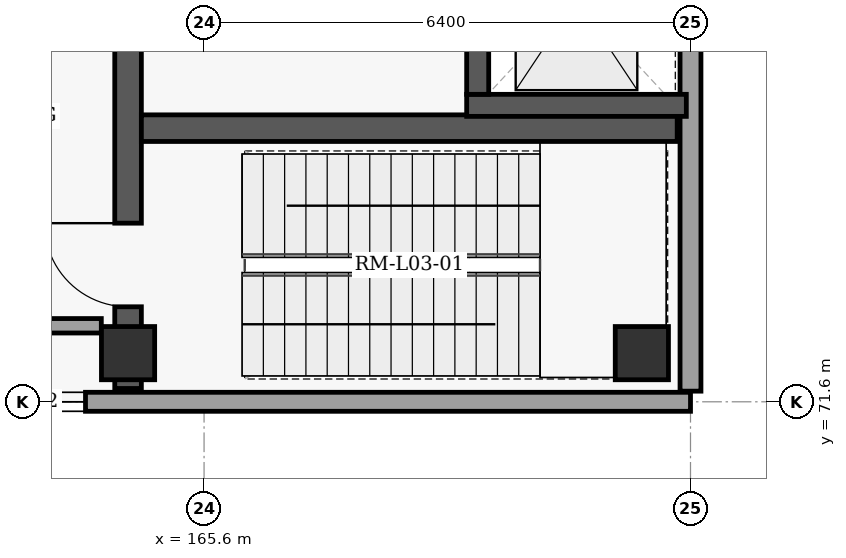
"""IFC4 building model, lengths in metres.
Left out: names, types, materials, properties, quantities, classifications, styles, units other than length and angle.
Written with IfcOpenShell. Run it as: python <this file> out.ifc"""

import sys

from ifc_helpers import new_model, si_unit, direction, frame, frame_2d, origin, origin_2d, place, context, subcontext, project, spatial, rectangle, extrude, element, fill, save


model = new_model("IFC4")
c1 = context("Model", 3, precision=1e-05, world=origin(), true_north=direction((0.0, 1.0)))
c2 = subcontext(c1, "Body", "Model", "MODEL_VIEW")
j1 = project(units=[si_unit("LENGTHUNIT", "METRE"), si_unit("PLANEANGLEUNIT", "RADIAN")], contexts=[c1])
p1 = place(None, origin())
s1 = spatial("IfcSite", under=j1, at=p1, CompositionType="ELEMENT")
p2 = place(p1, origin())
s2 = spatial("IfcBuilding", under=s1, at=p2, CompositionType="ELEMENT")
p3 = place(p2, frame((0.0, 0.0, 15.6)))
s3 = spatial("IfcBuildingStorey", under=s2, at=p3, CompositionType="ELEMENT", Elevation=15.6)
for number, where, z_axis, x_axis in (
    (1, (164.6, 72.24, 0.0), (0.0, 0.0, 1.0), (1.0, 0.0, 0.0)),
    (2, (171.36, 72.24, 0.0), (0.0, 0.0, 1.0), (1.0, 0.0, 0.0)),
):
    element("IfcColumn", number, at=place(p3, frame(where, z_axis=z_axis, x_axis=x_axis)), inside=s3, PredefinedType="COLUMN", context=c2, shape_type="SweptSolid", body=[
        extrude(rectangle(XDim=0.7, YDim=0.7, at=origin_2d()), origin(), (0.0, 0.0, 1.0), 4.8),
    ])
p4 = place(p3, frame((172.0, 117.86, 0.0), z_axis=(0.0, 0.0, 1.0), x_axis=(0.0, -1.0, 0.0)))
e3 = element("IfcWall", 3, at=p4, inside=s3, PredefinedType="SOLIDWALL", context=c2, shape_type="SweptSolid", body=[
    extrude(rectangle(XDim=46.12, YDim=0.275, at=frame_2d((23.06, 0.0))), origin(), (0.0, 0.0, 1.0), 4.58),
])
p5 = place(p3, frame((172.0, 71.6, 0.0), z_axis=(0.0, 0.0, 1.0), x_axis=(-1.0, 0.0, 0.0)))
e4 = element("IfcWall", 4, at=p5, inside=s3, PredefinedType="SOLIDWALL", context=c2, shape_type="SweptSolid", body=[
    extrude(rectangle(XDim=32.4, YDim=0.25, at=frame_2d((16.2, 0.0))), origin(), (0.0, 0.0, 1.0), 4.58),
])
p6 = place(p5, frame((7.96, 0.0, 0.8)))
e5 = element("IfcOpeningElement", 5, at=p6, cuts=e4, PredefinedType="OPENING", context=c2, shape_type="SweptSolid", body=[
    extrude(rectangle(XDim=1.5, YDim=2.1, at=frame_2d((0.75, 1.05))), frame((0.0, 0.135, 0.0), z_axis=(0.0, -1.0, 0.0), x_axis=(1.0, 0.0, 0.0)), (0.0, 0.0, 1.0), 0.27),
])
p7 = place(p5, frame((12.27, 0.0, 0.8)))
e6 = element("IfcOpeningElement", 6, at=p7, cuts=e4, PredefinedType="OPENING", context=c2, shape_type="SweptSolid", body=[
    extrude(rectangle(XDim=1.6, YDim=2.1, at=frame_2d((0.8, 1.05))), frame((0.0, 0.135, 0.0), z_axis=(0.0, -1.0, 0.0), x_axis=(1.0, 0.0, 0.0)), (0.0, 0.0, 1.0), 0.27),
])
p8 = place(p5, frame((19.48, 0.0, 0.8)))
e7 = element("IfcOpeningElement", 7, at=p8, cuts=e4, PredefinedType="OPENING", context=c2, shape_type="SweptSolid", body=[
    extrude(rectangle(XDim=1.7, YDim=2.15, at=frame_2d((0.85, 1.075))), frame((0.0, 0.135, 0.0), z_axis=(0.0, -1.0, 0.0), x_axis=(1.0, 0.0, 0.0)), (0.0, 0.0, 1.0), 0.27),
])
p9 = place(p5, frame((25.24, 0.0, 0.8)))
e8 = element("IfcOpeningElement", 8, at=p9, cuts=e4, PredefinedType="OPENING", context=c2, shape_type="SweptSolid", body=[
    extrude(rectangle(XDim=1.8, YDim=2.15, at=frame_2d((0.9, 1.075))), frame((0.0, 0.135, 0.0), z_axis=(0.0, -1.0, 0.0), x_axis=(1.0, 0.0, 0.0)), (0.0, 0.0, 1.0), 0.27),
])
p10 = place(p3, frame((164.6, 71.775, 0.0), z_axis=(0.0, 0.0, 1.0), x_axis=(0.0, 1.0, 0.0)))
e9 = element("IfcWall", 9, at=p10, inside=s3, PredefinedType="SHEAR", context=c2, shape_type="SweptSolid", body=[
    extrude(rectangle(XDim=7.473, YDim=0.35, at=frame_2d((3.737, 0.0))), origin(), (0.0, 0.0, 1.0), 4.58),
])
p11 = place(p10, frame((1.075, 0.0, 0.0)))
e10 = element("IfcOpeningElement", 10, at=p11, cuts=e9, PredefinedType="OPENING", context=c2, shape_type="SweptSolid", body=[
    extrude(rectangle(XDim=1.1, YDim=2.15, at=frame_2d((0.55, 1.075))), frame((0.0, 0.185, 0.0), z_axis=(0.0, -1.0, 0.0), x_axis=(1.0, 0.0, 0.0)), (0.0, 0.0, 1.0), 0.37),
])
p12 = place(p10, frame((5.05, 0.0, 0.0)))
e11 = element("IfcOpeningElement", 11, at=p12, cuts=e9, PredefinedType="OPENING", context=c2, shape_type="SweptSolid", body=[
    extrude(rectangle(XDim=1.15, YDim=2.2, at=frame_2d((0.575, 1.1))), frame((0.0, 0.185, 0.0), z_axis=(0.0, -1.0, 0.0), x_axis=(1.0, 0.0, 0.0)), (0.0, 0.0, 1.0), 0.37),
])
p13 = place(p3, frame((164.775, 75.2, 0.0), z_axis=(0.0, 0.0, 1.0), x_axis=(1.0, 0.0, 0.0)))
e12 = element("IfcWall", 12, at=p13, inside=s3, PredefinedType="SHEAR", context=c2, shape_type="SweptSolid", body=[
    extrude(rectangle(XDim=7.05, YDim=0.35, at=frame_2d((3.525, 0.0))), origin(), (0.0, 0.0, 1.0), 4.58),
])
p14 = place(p3, frame((169.055, 75.5, 0.0), z_axis=(0.0, 0.0, 1.0), x_axis=(1.0, 0.0, 0.0)))
e13 = element("IfcWall", 13, at=p14, inside=s3, PredefinedType="SHEAR", context=c2, shape_type="SweptSolid", body=[
    extrude(rectangle(XDim=2.89, YDim=0.29, at=frame_2d((1.445, 0.0))), origin(), (0.0, 0.0, 1.0), 4.58),
])
p15 = place(p3, frame((169.2, 75.645, 0.0), z_axis=(0.0, 0.0, 1.0), x_axis=(0.0, 1.0, 0.0)))
e14 = element("IfcWall", 14, at=p15, inside=s3, PredefinedType="SHEAR", context=c2, shape_type="SweptSolid", body=[
    extrude(rectangle(XDim=2.51, YDim=0.29, at=frame_2d((1.255, 0.0))), origin(), (0.0, 0.0, 1.0), 4.58),
])
p16 = place(p15, frame((0.705, 0.0, 0.0)))
e15 = element("IfcOpeningElement", 15, at=p16, cuts=e14, PredefinedType="OPENING", context=c2, shape_type="SweptSolid", body=[
    extrude(rectangle(XDim=1.1, YDim=2.15, at=frame_2d((0.55, 1.075))), frame((0.0, 0.155, 0.0), z_axis=(0.0, -1.0, 0.0), x_axis=(1.0, 0.0, 0.0)), (0.0, 0.0, 1.0), 0.31),
])
p17 = place(p3, frame((160.105, 72.6, 0.0), z_axis=(0.0, 0.0, 1.0), x_axis=(1.0, 0.0, 0.0)))
e16 = element("IfcWall", 16, at=p17, inside=s3, PredefinedType="PARTITIONING", context=c2, shape_type="SweptSolid", body=[
    extrude(rectangle(XDim=4.143, YDim=0.19, at=frame_2d((2.072, 0.0))), origin(), (0.0, 0.0, 1.0), 3.93),
])
p18 = place(p6, origin())
e17 = element("IfcWindow", 17, at=p18, inside=s3, PartitioningType="SINGLE_PANEL", PredefinedType="WINDOW", context=c2, shape_type="SweptSolid", body=[
    extrude(rectangle(XDim=1.5, YDim=2.1, at=frame_2d((0.75, 1.05))), frame((0.0, 0.03, 0.0), z_axis=(0.0, -1.0, 0.0), x_axis=(1.0, 0.0, 0.0)), (0.0, 0.0, 1.0), 0.06),
])
fill(e5, e17)
p19 = place(p11, origin())
e18 = element("IfcDoor", 18, at=p19, inside=s3, OperationType="SINGLE_SWING_RIGHT", PredefinedType="DOOR", context=c2, shape_type="SweptSolid", body=[
    extrude(rectangle(XDim=1.1, YDim=2.15, at=frame_2d((0.55, 1.075))), frame((0.0, 0.025, 0.0), z_axis=(0.0, -1.0, 0.0), x_axis=(1.0, 0.0, 0.0)), (0.0, 0.0, 1.0), 0.05),
])
fill(e10, e18)
save(model, sys.argv[1])
